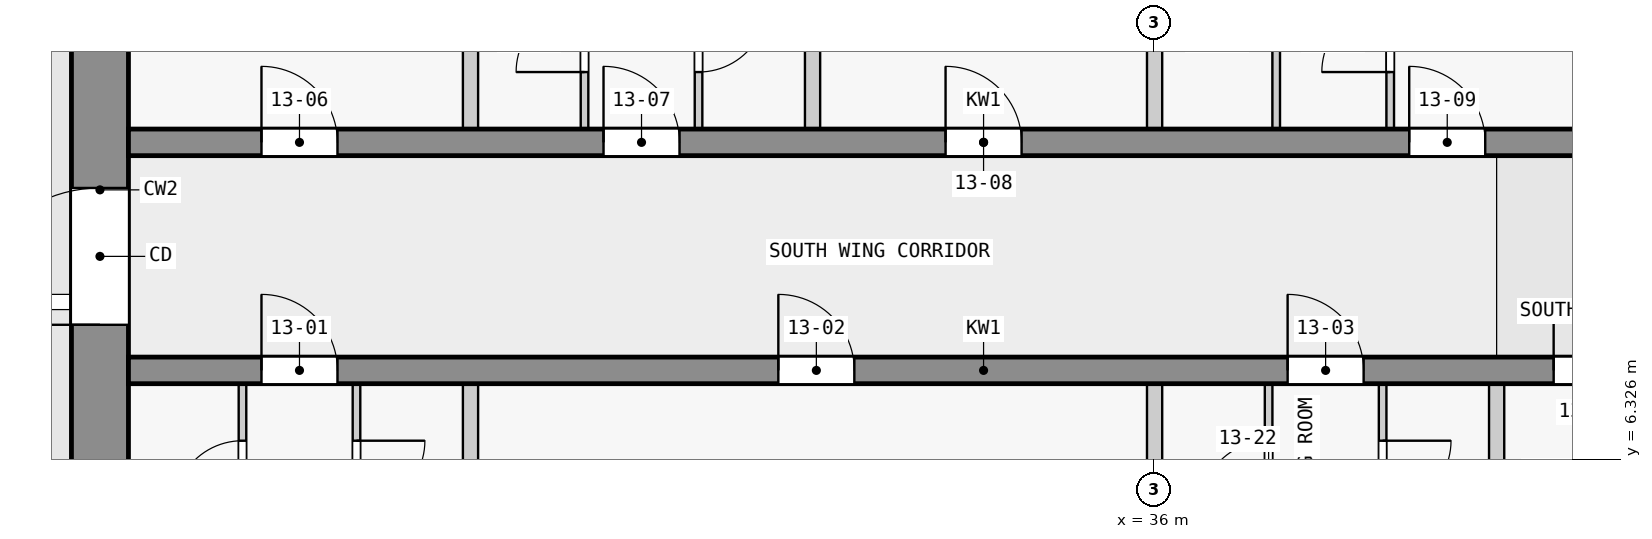
"""IFC4 building model, lengths in metres.
Left out: names, types, materials, properties, quantities, classifications, styles, units other than length and angle.
Written with IfcOpenShell. Run it as: python <this file> out.ifc"""

import sys

from ifc_helpers import new_model, si_unit, direction, frame, frame_2d, origin, place, context, subcontext, project, spatial, rectangle, extrude, element, fill, save


model = new_model("IFC4")
c1 = context("Model", 3, precision=1e-05, world=origin(), true_north=direction((0.0, 1.0)))
c2 = subcontext(c1, "Body", "Model", "MODEL_VIEW")
j1 = project(units=[si_unit("LENGTHUNIT", "METRE"), si_unit("PLANEANGLEUNIT", "RADIAN")], contexts=[c1])
p1 = place(None, origin())
s1 = spatial("IfcSite", under=j1, at=p1, CompositionType="ELEMENT")
p2 = place(p1, origin())
s2 = spatial("IfcBuilding", under=s1, at=p2, CompositionType="ELEMENT")
p3 = place(p2, frame((0.0, 0.0, 54.8)))
s3 = spatial("IfcBuildingStorey", under=s2, at=p3, CompositionType="ELEMENT", Elevation=54.8)
p4 = place(p3, frame((22.125, 2.5, 0.0), z_axis=(0.0, 0.0, 1.0), x_axis=(0.0, 1.0, 0.0)))
e1 = element("IfcWall", 1, at=p4, inside=s3, PredefinedType="SHEAR", context=c2, shape_type="SweptSolid", body=[
    extrude(rectangle(XDim=14.75, YDim=0.75, at=frame_2d((7.375, 0.0))), origin(), (0.0, 0.0, 1.0), 3.25),
])
p5 = place(p4, frame((5.6, 0.0, 0.0)))
e2 = element("IfcOpeningElement", 2, at=p5, cuts=e1, PredefinedType="OPENING", context=c2, shape_type="SweptSolid", body=[
    extrude(rectangle(XDim=1.8, YDim=2.1, at=frame_2d((0.9, 1.05))), frame((0.0, 0.385, 0.0), z_axis=(0.0, -1.0, 0.0), x_axis=(1.0, 0.0, 0.0)), (0.0, 0.0, 1.0), 0.77),
])
p6 = place(p3, frame((22.5, 7.5, 0.0), z_axis=(0.0, 0.0, 1.0), x_axis=(1.0, 0.0, 0.0)))
e3 = element("IfcWall", 3, at=p6, inside=s3, PredefinedType="SHEAR", context=c2, shape_type="SweptSolid", body=[
    extrude(rectangle(XDim=22.5, YDim=0.35, at=frame_2d((11.25, 0.0))), origin(), (0.0, 0.0, 1.0), 3.25),
])
p7 = place(p6, frame((1.75, 0.0, 0.0)))
e4 = element("IfcOpeningElement", 4, at=p7, cuts=e3, PredefinedType="OPENING", context=c2, shape_type="SweptSolid", body=[
    extrude(rectangle(XDim=1.0, YDim=2.1, at=frame_2d((0.5, 1.05))), frame((0.0, 0.185, 0.0), z_axis=(0.0, -1.0, 0.0), x_axis=(1.0, 0.0, 0.0)), (0.0, 0.0, 1.0), 0.37),
])
p8 = place(p6, frame((8.55, 0.0, 0.0)))
e5 = element("IfcOpeningElement", 5, at=p8, cuts=e3, PredefinedType="OPENING", context=c2, shape_type="SweptSolid", body=[
    extrude(rectangle(XDim=1.0, YDim=2.1, at=frame_2d((0.5, 1.05))), frame((0.0, 0.185, 0.0), z_axis=(0.0, -1.0, 0.0), x_axis=(1.0, 0.0, 0.0)), (0.0, 0.0, 1.0), 0.37),
])
p9 = place(p6, frame((15.25, 0.0, 0.0)))
e6 = element("IfcOpeningElement", 6, at=p9, cuts=e3, PredefinedType="OPENING", context=c2, shape_type="SweptSolid", body=[
    extrude(rectangle(XDim=1.0, YDim=2.1, at=frame_2d((0.5, 1.05))), frame((0.0, 0.185, 0.0), z_axis=(0.0, -1.0, 0.0), x_axis=(1.0, 0.0, 0.0)), (0.0, 0.0, 1.0), 0.37),
])
p10 = place(p6, frame((18.75, 0.0, 0.0)))
e7 = element("IfcOpeningElement", 7, at=p10, cuts=e3, PredefinedType="OPENING", context=c2, shape_type="SweptSolid", body=[
    extrude(rectangle(XDim=0.9, YDim=2.1, at=frame_2d((0.45, 1.05))), frame((0.0, 0.185, 0.0), z_axis=(0.0, -1.0, 0.0), x_axis=(1.0, 0.0, 0.0)), (0.0, 0.0, 1.0), 0.37),
])
p11 = place(p6, frame((20.95, 0.0, 0.0)))
e8 = element("IfcOpeningElement", 8, at=p11, cuts=e3, PredefinedType="OPENING", context=c2, shape_type="SweptSolid", body=[
    extrude(rectangle(XDim=1.0, YDim=2.1, at=frame_2d((0.5, 1.05))), frame((0.0, 0.185, 0.0), z_axis=(0.0, -1.0, 0.0), x_axis=(1.0, 0.0, 0.0)), (0.0, 0.0, 1.0), 0.37),
])
p12 = place(p3, frame((22.5, 10.5, 0.0), z_axis=(0.0, 0.0, 1.0), x_axis=(1.0, 0.0, 0.0)))
e9 = element("IfcWall", 9, at=p12, inside=s3, PredefinedType="SHEAR", context=c2, shape_type="SweptSolid", body=[
    extrude(rectangle(XDim=22.5, YDim=0.35, at=frame_2d((11.25, 0.0))), origin(), (0.0, 0.0, 1.0), 3.25),
])
p13 = place(p12, frame((1.75, 0.0, 0.0)))
e10 = element("IfcOpeningElement", 10, at=p13, cuts=e9, PredefinedType="OPENING", context=c2, shape_type="SweptSolid", body=[
    extrude(rectangle(XDim=1.0, YDim=2.1, at=frame_2d((0.5, 1.05))), frame((0.0, 0.185, 0.0), z_axis=(0.0, -1.0, 0.0), x_axis=(1.0, 0.0, 0.0)), (0.0, 0.0, 1.0), 0.37),
])
p14 = place(p12, frame((6.25, 0.0, 0.0)))
e11 = element("IfcOpeningElement", 11, at=p14, cuts=e9, PredefinedType="OPENING", context=c2, shape_type="SweptSolid", body=[
    extrude(rectangle(XDim=1.0, YDim=2.1, at=frame_2d((0.5, 1.05))), frame((0.0, 0.185, 0.0), z_axis=(0.0, -1.0, 0.0), x_axis=(1.0, 0.0, 0.0)), (0.0, 0.0, 1.0), 0.37),
])
p15 = place(p12, frame((10.75, 0.0, 0.0)))
e12 = element("IfcOpeningElement", 12, at=p15, cuts=e9, PredefinedType="OPENING", context=c2, shape_type="SweptSolid", body=[
    extrude(rectangle(XDim=1.0, YDim=2.1, at=frame_2d((0.5, 1.05))), frame((0.0, 0.185, 0.0), z_axis=(0.0, -1.0, 0.0), x_axis=(1.0, 0.0, 0.0)), (0.0, 0.0, 1.0), 0.37),
])
p16 = place(p12, frame((16.85, 0.0, 0.0)))
e13 = element("IfcOpeningElement", 13, at=p16, cuts=e9, PredefinedType="OPENING", context=c2, shape_type="SweptSolid", body=[
    extrude(rectangle(XDim=1.0, YDim=2.1, at=frame_2d((0.5, 1.05))), frame((0.0, 0.185, 0.0), z_axis=(0.0, -1.0, 0.0), x_axis=(1.0, 0.0, 0.0)), (0.0, 0.0, 1.0), 0.37),
])
p17 = place(p3, frame((24.0, 4.925, 0.0), z_axis=(0.0, 0.0, 1.0), x_axis=(0.0, 1.0, 0.0)))
e14 = element("IfcWall", 14, at=p17, inside=s3, PredefinedType="PARTITIONING", context=c2, shape_type="SweptSolid", body=[
    extrude(rectangle(XDim=2.4, YDim=0.1, at=frame_2d((1.2, 0.0))), origin(), (0.0, 0.0, 1.0), 3.25),
])
p18 = place(p17, frame((0.75, 0.0, 0.0)))
e15 = element("IfcOpeningElement", 15, at=p18, cuts=e14, PredefinedType="OPENING", context=c2, shape_type="SweptSolid", body=[
    extrude(rectangle(XDim=0.9, YDim=2.1, at=frame_2d((0.45, 1.05))), frame((0.0, 0.06, 0.0), z_axis=(0.0, -1.0, 0.0), x_axis=(1.0, 0.0, 0.0)), (0.0, 0.0, 1.0), 0.12),
])
p19 = place(p3, frame((25.5, 7.325, 0.0), z_axis=(0.0, 0.0, 1.0), x_axis=(0.0, -1.0, 0.0)))
e16 = element("IfcWall", 16, at=p19, inside=s3, PredefinedType="PARTITIONING", context=c2, shape_type="SweptSolid", body=[
    extrude(rectangle(XDim=2.4, YDim=0.1, at=frame_2d((1.2, 0.0))), origin(), (0.0, 0.0, 1.0), 3.25),
])
p20 = place(p19, frame((0.75, 0.0, 0.0)))
e17 = element("IfcOpeningElement", 17, at=p20, cuts=e16, PredefinedType="OPENING", context=c2, shape_type="SweptSolid", body=[
    extrude(rectangle(XDim=0.9, YDim=2.1, at=frame_2d((0.45, 1.05))), frame((0.0, 0.06, 0.0), z_axis=(0.0, -1.0, 0.0), x_axis=(1.0, 0.0, 0.0)), (0.0, 0.0, 1.0), 0.12),
])
p21 = place(p3, frame((27.0, 5.025, 0.0), z_axis=(0.0, 0.0, 1.0), x_axis=(0.0, 1.0, 0.0)))
e18 = element("IfcWall", 18, at=p21, inside=s3, PredefinedType="PARTITIONING", context=c2, shape_type="SweptSolid", body=[
    extrude(rectangle(XDim=2.3, YDim=0.2, at=frame_2d((1.15, 0.0))), origin(), (0.0, 0.0, 1.0), 3.25),
])
p22 = place(p3, frame((27.0, 10.675, 0.0), z_axis=(0.0, 0.0, 1.0), x_axis=(0.0, 1.0, 0.0)))
e19 = element("IfcWall", 19, at=p22, inside=s3, PredefinedType="PARTITIONING", context=c2, shape_type="SweptSolid", body=[
    extrude(rectangle(XDim=5.798, YDim=0.2, at=frame_2d((2.899, 0.0))), origin(), (0.0, 0.0, 1.0), 3.25),
])
p23 = place(p3, frame((28.5, 10.675, 0.0), z_axis=(0.0, 0.0, 1.0), x_axis=(0.0, 1.0, 0.0)))
e20 = element("IfcWall", 20, at=p23, inside=s3, PredefinedType="PARTITIONING", context=c2, shape_type="SweptSolid", body=[
    extrude(rectangle(XDim=2.4, YDim=0.1, at=frame_2d((1.2, 0.0))), origin(), (0.0, 0.0, 1.0), 3.25),
])
p24 = place(p23, frame((0.75, 0.0, 0.0)))
e21 = element("IfcOpeningElement", 21, at=p24, cuts=e20, PredefinedType="OPENING", context=c2, shape_type="SweptSolid", body=[
    extrude(rectangle(XDim=0.9, YDim=2.1, at=frame_2d((0.45, 1.05))), frame((0.0, 0.06, 0.0), z_axis=(0.0, -1.0, 0.0), x_axis=(1.0, 0.0, 0.0)), (0.0, 0.0, 1.0), 0.12),
])
p25 = place(p3, frame((30.0, 13.075, 0.0), z_axis=(0.0, 0.0, 1.0), x_axis=(0.0, -1.0, 0.0)))
e22 = element("IfcWall", 22, at=p25, inside=s3, PredefinedType="PARTITIONING", context=c2, shape_type="SweptSolid", body=[
    extrude(rectangle(XDim=2.4, YDim=0.1, at=frame_2d((1.2, 0.0))), origin(), (0.0, 0.0, 1.0), 3.25),
])
p26 = place(p25, frame((0.75, 0.0, 0.0)))
e23 = element("IfcOpeningElement", 23, at=p26, cuts=e22, PredefinedType="OPENING", context=c2, shape_type="SweptSolid", body=[
    extrude(rectangle(XDim=0.9, YDim=2.1, at=frame_2d((0.45, 1.05))), frame((0.0, 0.06, 0.0), z_axis=(0.0, -1.0, 0.0), x_axis=(1.0, 0.0, 0.0)), (0.0, 0.0, 1.0), 0.12),
])
p27 = place(p3, frame((31.5, 10.675, 0.0), z_axis=(0.0, 0.0, 1.0), x_axis=(0.0, 1.0, 0.0)))
e24 = element("IfcWall", 24, at=p27, inside=s3, PredefinedType="PARTITIONING", context=c2, shape_type="SweptSolid", body=[
    extrude(rectangle(XDim=2.3, YDim=0.2, at=frame_2d((1.15, 0.0))), origin(), (0.0, 0.0, 1.0), 3.25),
])
for number, where, z_axis, x_axis in (
    (25, (36.0, 1.4, 0.0), (0.0, 0.0, 1.0), (0.0, 1.0, 0.0)),
    (26, (36.0, 10.675, 0.0), (0.0, 0.0, 1.0), (0.0, 1.0, 0.0)),
):
    element("IfcWall", number, at=place(p3, frame(where, z_axis=z_axis, x_axis=x_axis)), inside=s3, PredefinedType="PARTITIONING", context=c2, shape_type="SweptSolid", body=[
        extrude(rectangle(XDim=5.925, YDim=0.2, at=frame_2d((2.962, 0.0))), origin(), (0.0, 0.0, 1.0), 3.25),
    ])
p28 = place(p3, frame((37.5, 4.925, 0.0), z_axis=(0.0, 0.0, 1.0), x_axis=(0.0, 1.0, 0.0)))
e27 = element("IfcWall", 27, at=p28, inside=s3, PredefinedType="PARTITIONING", context=c2, shape_type="SweptSolid", body=[
    extrude(rectangle(XDim=2.4, YDim=0.1, at=frame_2d((1.2, 0.0))), origin(), (0.0, 0.0, 1.0), 3.25),
])
p29 = place(p28, frame((0.75, 0.0, 0.0)))
e28 = element("IfcOpeningElement", 28, at=p29, cuts=e27, PredefinedType="OPENING", context=c2, shape_type="SweptSolid", body=[
    extrude(rectangle(XDim=0.9, YDim=2.1, at=frame_2d((0.45, 1.05))), frame((0.0, 0.06, 0.0), z_axis=(0.0, -1.0, 0.0), x_axis=(1.0, 0.0, 0.0)), (0.0, 0.0, 1.0), 0.12),
])
p30 = place(p3, frame((37.6, 10.675, 0.0), z_axis=(0.0, 0.0, 1.0), x_axis=(0.0, 1.0, 0.0)))
e29 = element("IfcWall", 29, at=p30, inside=s3, PredefinedType="PARTITIONING", context=c2, shape_type="SweptSolid", body=[
    extrude(rectangle(XDim=2.35, YDim=0.1, at=frame_2d((1.175, 0.0))), origin(), (0.0, 0.0, 1.0), 3.25),
])
p31 = place(p3, frame((39.0, 7.325, 0.0), z_axis=(0.0, 0.0, 1.0), x_axis=(0.0, -1.0, 0.0)))
e30 = element("IfcWall", 30, at=p31, inside=s3, PredefinedType="PARTITIONING", context=c2, shape_type="SweptSolid", body=[
    extrude(rectangle(XDim=2.4, YDim=0.1, at=frame_2d((1.2, 0.0))), origin(), (0.0, 0.0, 1.0), 3.25),
])
p32 = place(p31, frame((0.75, 0.0, 0.0)))
e31 = element("IfcOpeningElement", 31, at=p32, cuts=e30, PredefinedType="OPENING", context=c2, shape_type="SweptSolid", body=[
    extrude(rectangle(XDim=0.9, YDim=2.1, at=frame_2d((0.45, 1.05))), frame((0.0, 0.06, 0.0), z_axis=(0.0, -1.0, 0.0), x_axis=(1.0, 0.0, 0.0)), (0.0, 0.0, 1.0), 0.12),
])
p33 = place(p3, frame((39.1, 10.675, 0.0), z_axis=(0.0, 0.0, 1.0), x_axis=(0.0, 1.0, 0.0)))
e32 = element("IfcWall", 32, at=p33, inside=s3, PredefinedType="PARTITIONING", context=c2, shape_type="SweptSolid", body=[
    extrude(rectangle(XDim=2.35, YDim=0.1, at=frame_2d((1.175, 0.0))), origin(), (0.0, 0.0, 1.0), 3.25),
])
p34 = place(p33, frame((0.75, 0.0, 0.0)))
e33 = element("IfcOpeningElement", 33, at=p34, cuts=e32, PredefinedType="OPENING", context=c2, shape_type="SweptSolid", body=[
    extrude(rectangle(XDim=0.9, YDim=2.1, at=frame_2d((0.45, 1.05))), frame((0.0, 0.06, 0.0), z_axis=(0.0, -1.0, 0.0), x_axis=(1.0, 0.0, 0.0)), (0.0, 0.0, 1.0), 0.12),
])
p35 = place(p3, frame((40.5, 5.025, 0.0), z_axis=(0.0, 0.0, 1.0), x_axis=(0.0, 1.0, 0.0)))
e34 = element("IfcWall", 34, at=p35, inside=s3, PredefinedType="PARTITIONING", context=c2, shape_type="SweptSolid", body=[
    extrude(rectangle(XDim=2.3, YDim=0.2, at=frame_2d((1.15, 0.0))), origin(), (0.0, 0.0, 1.0), 3.25),
])
p36 = place(p5, origin())
e35 = element("IfcDoor", 35, at=p36, inside=s3, OperationType="DOUBLE_DOOR_SINGLE_SWING", PredefinedType="DOOR", context=c2, shape_type="SweptSolid", body=[
    extrude(rectangle(XDim=1.8, YDim=2.1, at=frame_2d((0.9, 1.05))), frame((0.0, 0.025, 0.0), z_axis=(0.0, -1.0, 0.0), x_axis=(1.0, 0.0, 0.0)), (0.0, 0.0, 1.0), 0.05),
])
fill(e2, e35)
p37 = place(p7, origin())
e36 = element("IfcDoor", 36, at=p37, inside=s3, OperationType="SINGLE_SWING_LEFT", PredefinedType="DOOR", context=c2, shape_type="SweptSolid", body=[
    extrude(rectangle(XDim=1.0, YDim=2.1, at=frame_2d((0.5, 1.05))), frame((0.0, 0.025, 0.0), z_axis=(0.0, -1.0, 0.0), x_axis=(1.0, 0.0, 0.0)), (0.0, 0.0, 1.0), 0.05),
])
fill(e4, e36)
p38 = place(p8, origin())
e37 = element("IfcDoor", 37, at=p38, inside=s3, OperationType="SINGLE_SWING_LEFT", PredefinedType="DOOR", context=c2, shape_type="SweptSolid", body=[
    extrude(rectangle(XDim=1.0, YDim=2.1, at=frame_2d((0.5, 1.05))), frame((0.0, 0.025, 0.0), z_axis=(0.0, -1.0, 0.0), x_axis=(1.0, 0.0, 0.0)), (0.0, 0.0, 1.0), 0.05),
])
fill(e5, e37)
p39 = place(p9, origin())
e38 = element("IfcDoor", 38, at=p39, inside=s3, OperationType="SINGLE_SWING_RIGHT", PredefinedType="DOOR", context=c2, shape_type="SweptSolid", body=[
    extrude(rectangle(XDim=1.0, YDim=2.1, at=frame_2d((0.5, 1.05))), frame((0.0, 0.025, 0.0), z_axis=(0.0, -1.0, 0.0), x_axis=(1.0, 0.0, 0.0)), (0.0, 0.0, 1.0), 0.05),
])
fill(e6, e38)
p40 = place(p10, origin())
e39 = element("IfcDoor", 39, at=p40, inside=s3, OperationType="SINGLE_SWING_RIGHT", PredefinedType="DOOR", context=c2, shape_type="SweptSolid", body=[
    extrude(rectangle(XDim=0.9, YDim=2.1, at=frame_2d((0.45, 1.05))), frame((0.0, 0.025, 0.0), z_axis=(0.0, -1.0, 0.0), x_axis=(1.0, 0.0, 0.0)), (0.0, 0.0, 1.0), 0.05),
])
fill(e7, e39)
p41 = place(p13, origin())
e40 = element("IfcDoor", 40, at=p41, inside=s3, OperationType="SINGLE_SWING_LEFT", PredefinedType="DOOR", context=c2, shape_type="SweptSolid", body=[
    extrude(rectangle(XDim=1.0, YDim=2.1, at=frame_2d((0.5, 1.05))), frame((0.0, 0.025, 0.0), z_axis=(0.0, -1.0, 0.0), x_axis=(1.0, 0.0, 0.0)), (0.0, 0.0, 1.0), 0.05),
])
fill(e10, e40)
p42 = place(p14, origin())
e41 = element("IfcDoor", 41, at=p42, inside=s3, OperationType="SINGLE_SWING_LEFT", PredefinedType="DOOR", context=c2, shape_type="SweptSolid", body=[
    extrude(rectangle(XDim=1.0, YDim=2.1, at=frame_2d((0.5, 1.05))), frame((0.0, 0.025, 0.0), z_axis=(0.0, -1.0, 0.0), x_axis=(1.0, 0.0, 0.0)), (0.0, 0.0, 1.0), 0.05),
])
fill(e11, e41)
p43 = place(p15, origin())
e42 = element("IfcDoor", 42, at=p43, inside=s3, OperationType="SINGLE_SWING_LEFT", PredefinedType="DOOR", context=c2, shape_type="SweptSolid", body=[
    extrude(rectangle(XDim=1.0, YDim=2.1, at=frame_2d((0.5, 1.05))), frame((0.0, 0.025, 0.0), z_axis=(0.0, -1.0, 0.0), x_axis=(1.0, 0.0, 0.0)), (0.0, 0.0, 1.0), 0.05),
])
fill(e12, e42)
p44 = place(p16, origin())
e43 = element("IfcDoor", 43, at=p44, inside=s3, OperationType="SINGLE_SWING_RIGHT", PredefinedType="DOOR", context=c2, shape_type="SweptSolid", body=[
    extrude(rectangle(XDim=1.0, YDim=2.1, at=frame_2d((0.5, 1.05))), frame((0.0, 0.025, 0.0), z_axis=(0.0, -1.0, 0.0), x_axis=(1.0, 0.0, 0.0)), (0.0, 0.0, 1.0), 0.05),
])
fill(e13, e43)
p45 = place(p18, origin())
e44 = element("IfcDoor", 44, at=p45, inside=s3, OperationType="SINGLE_SWING_LEFT", PredefinedType="DOOR", context=c2, shape_type="SweptSolid", body=[
    extrude(rectangle(XDim=0.9, YDim=2.1, at=frame_2d((0.45, 1.05))), frame((0.0, 0.025, 0.0), z_axis=(0.0, -1.0, 0.0), x_axis=(1.0, 0.0, 0.0)), (0.0, 0.0, 1.0), 0.05),
])
fill(e15, e44)
p46 = place(p20, origin())
e45 = element("IfcDoor", 45, at=p46, inside=s3, OperationType="SINGLE_SWING_LEFT", PredefinedType="DOOR", context=c2, shape_type="SweptSolid", body=[
    extrude(rectangle(XDim=0.9, YDim=2.1, at=frame_2d((0.45, 1.05))), frame((0.0, 0.025, 0.0), z_axis=(0.0, -1.0, 0.0), x_axis=(1.0, 0.0, 0.0)), (0.0, 0.0, 1.0), 0.05),
])
fill(e17, e45)
p47 = place(p29, origin())
e46 = element("IfcDoor", 46, at=p47, inside=s3, OperationType="SINGLE_SWING_LEFT", PredefinedType="DOOR", context=c2, shape_type="SweptSolid", body=[
    extrude(rectangle(XDim=0.9, YDim=2.1, at=frame_2d((0.45, 1.05))), frame((0.0, 0.025, 0.0), z_axis=(0.0, -1.0, 0.0), x_axis=(1.0, 0.0, 0.0)), (0.0, 0.0, 1.0), 0.05),
])
fill(e28, e46)
p48 = place(p32, origin())
e47 = element("IfcDoor", 47, at=p48, inside=s3, OperationType="SINGLE_SWING_LEFT", PredefinedType="DOOR", context=c2, shape_type="SweptSolid", body=[
    extrude(rectangle(XDim=0.9, YDim=2.1, at=frame_2d((0.45, 1.05))), frame((0.0, 0.025, 0.0), z_axis=(0.0, -1.0, 0.0), x_axis=(1.0, 0.0, 0.0)), (0.0, 0.0, 1.0), 0.05),
])
fill(e31, e47)
p49 = place(p24, origin())
e48 = element("IfcDoor", 48, at=p49, inside=s3, OperationType="SINGLE_SWING_RIGHT", PredefinedType="DOOR", context=c2, shape_type="SweptSolid", body=[
    extrude(rectangle(XDim=0.9, YDim=2.1, at=frame_2d((0.45, 1.05))), frame((0.0, 0.025, 0.0), z_axis=(0.0, -1.0, 0.0), x_axis=(1.0, 0.0, 0.0)), (0.0, 0.0, 1.0), 0.05),
])
fill(e21, e48)
p50 = place(p26, origin())
e49 = element("IfcDoor", 49, at=p50, inside=s3, OperationType="SINGLE_SWING_RIGHT", PredefinedType="DOOR", context=c2, shape_type="SweptSolid", body=[
    extrude(rectangle(XDim=0.9, YDim=2.1, at=frame_2d((0.45, 1.05))), frame((0.0, 0.025, 0.0), z_axis=(0.0, -1.0, 0.0), x_axis=(1.0, 0.0, 0.0)), (0.0, 0.0, 1.0), 0.05),
])
fill(e23, e49)
p51 = place(p34, origin())
e50 = element("IfcDoor", 50, at=p51, inside=s3, OperationType="SINGLE_SWING_RIGHT", PredefinedType="DOOR", context=c2, shape_type="SweptSolid", body=[
    extrude(rectangle(XDim=0.9, YDim=2.1, at=frame_2d((0.45, 1.05))), frame((0.0, 0.025, 0.0), z_axis=(0.0, -1.0, 0.0), x_axis=(1.0, 0.0, 0.0)), (0.0, 0.0, 1.0), 0.05),
])
fill(e33, e50)
save(model, sys.argv[1])
